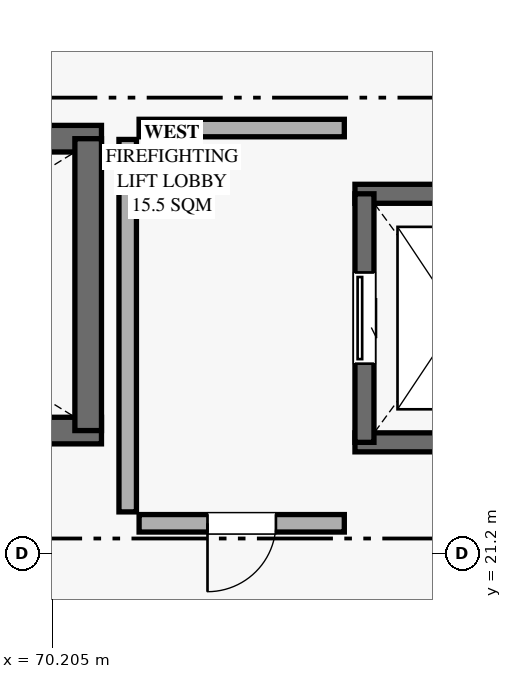
"""IFC4 building model, lengths in metres.
Left out: names, types, materials, properties, quantities, classifications, styles, units other than length and angle.
Written with IfcOpenShell. Run it as: python <this file> out.ifc"""

import sys

from ifc_helpers import new_model, si_unit, direction, frame, frame_2d, origin, place, context, subcontext, project, spatial, rectangle, extrude, element, fill, save


model = new_model("IFC4")
c1 = context("Model", 3, precision=1e-05, world=origin(), true_north=direction((0.0, 1.0)))
c2 = subcontext(c1, "Body", "Model", "MODEL_VIEW")
j1 = project(units=[si_unit("LENGTHUNIT", "METRE"), si_unit("PLANEANGLEUNIT", "RADIAN")], contexts=[c1])
p1 = place(None, origin())
s1 = spatial("IfcSite", under=j1, at=p1, CompositionType="ELEMENT")
p2 = place(p1, origin())
s2 = spatial("IfcBuilding", under=s1, at=p2, CompositionType="ELEMENT")
p3 = place(p2, frame((0.0, 0.0, 24.3)))
s3 = spatial("IfcBuildingStorey", under=s2, at=p3, CompositionType="ELEMENT", Elevation=24.3)
for number, where, z_axis, x_axis in (
    (1, (70.855, 22.82, 0.0), (0.0, 0.0, 1.0), (-1.0, 0.0, 0.0)),
    (2, (62.845, 26.66, 0.0), (0.0, 0.0, 1.0), (1.0, 0.0, 0.0)),
):
    element("IfcWall", number, at=place(p3, frame(where, z_axis=z_axis, x_axis=x_axis)), inside=s3, PredefinedType="SHEAR", context=c2, shape_type="SweptSolid", body=[
        extrude(rectangle(XDim=8.01, YDim=0.35, at=frame_2d((4.005, 0.0))), origin(), (0.0, 0.0, 1.0), 4.23),
    ])
p4 = place(p3, frame((70.68, 26.66, 0.0), z_axis=(0.0, 0.0, 1.0), x_axis=(0.0, -1.0, 0.0)))
e3 = element("IfcWall", 3, at=p4, inside=s3, PredefinedType="SHEAR", context=c2, shape_type="SweptSolid", body=[
    extrude(rectangle(XDim=3.84, YDim=0.35, at=frame_2d((1.92, 0.0))), origin(), (0.0, 0.0, 1.0), 4.23),
])
for number, where, z_axis, x_axis in (
    (4, (76.91, 22.665, 0.0), (0.0, 0.0, 1.0), (-1.0, 0.0, 0.0)),
    (5, (74.19, 25.935, 0.0), (0.0, 0.0, 1.0), (1.0, 0.0, 0.0)),
):
    element("IfcWall", number, at=place(p3, frame(where, z_axis=z_axis, x_axis=x_axis)), inside=s3, PredefinedType="SHEAR", context=c2, shape_type="SweptSolid", body=[
        extrude(rectangle(XDim=2.72, YDim=0.25, at=frame_2d((1.36, 0.0))), origin(), (0.0, 0.0, 1.0), 4.23),
    ])
p5 = place(p3, frame((74.315, 22.665, 0.0), z_axis=(0.0, 0.0, 1.0), x_axis=(0.0, 1.0, 0.0)))
e6 = element("IfcWall", 6, at=p5, inside=s3, PredefinedType="SHEAR", context=c2, shape_type="SweptSolid", body=[
    extrude(rectangle(XDim=3.27, YDim=0.25, at=frame_2d((1.635, 0.0))), origin(), (0.0, 0.0, 1.0), 4.23),
])
p6 = place(p5, frame((1.035, 0.0, 0.0)))
e7 = element("IfcOpeningElement", 7, at=p6, cuts=e6, PredefinedType="OPENING", context=c2, shape_type="SweptSolid", body=[
    extrude(rectangle(XDim=1.2, YDim=2.25, at=frame_2d((0.6, 1.125))), frame((0.0, 0.135, 0.0), z_axis=(0.0, -1.0, 0.0), x_axis=(1.0, 0.0, 0.0)), (0.0, 0.0, 1.0), 0.27),
])
p7 = place(p3, frame((74.05, 21.6, 0.0), z_axis=(0.0, 0.0, 1.0), x_axis=(-1.0, 0.0, 0.0)))
e8 = element("IfcWall", 8, at=p7, inside=s3, PredefinedType="PARTITIONING", context=c2, shape_type="SweptSolid", body=[
    extrude(rectangle(XDim=2.7, YDim=0.23, at=frame_2d((1.35, 0.0))), origin(), (0.0, 0.0, 1.0), 2.98),
])
p8 = place(p7, frame((0.9, 0.0, 0.0)))
e9 = element("IfcOpeningElement", 9, at=p8, cuts=e8, PredefinedType="OPENING", context=c2, shape_type="SweptSolid", body=[
    extrude(rectangle(XDim=0.9, YDim=2.12, at=frame_2d((0.45, 1.06))), frame((0.0, 0.125, 0.0), z_axis=(0.0, -1.0, 0.0), x_axis=(1.0, 0.0, 0.0)), (0.0, 0.0, 1.0), 0.25),
])
p9 = place(p3, frame((71.35, 26.8, 0.0), z_axis=(0.0, 0.0, 1.0), x_axis=(1.0, 0.0, 0.0)))
e10 = element("IfcWall", 10, at=p9, inside=s3, PredefinedType="PARTITIONING", context=c2, shape_type="SweptSolid", body=[
    extrude(rectangle(XDim=2.7, YDim=0.23, at=frame_2d((1.35, 0.0))), origin(), (0.0, 0.0, 1.0), 2.98),
])
p10 = place(p3, frame((71.2, 21.75, 0.0), z_axis=(0.0, 0.0, 1.0), x_axis=(0.0, 1.0, 0.0)))
e11 = element("IfcWall", 11, at=p10, inside=s3, PredefinedType="PARTITIONING", context=c2, shape_type="SweptSolid", body=[
    extrude(rectangle(XDim=4.9, YDim=0.23, at=frame_2d((2.45, 0.0))), origin(), (0.0, 0.0, 1.0), 2.98),
])
p11 = place(p6, origin())
e12 = element("IfcDoor", 12, at=p11, inside=s3, OperationType="SLIDING_TO_LEFT", PredefinedType="DOOR", context=c2, shape_type="SweptSolid", body=[
    extrude(rectangle(XDim=1.2, YDim=2.25, at=frame_2d((0.6, 1.125))), frame((0.0, 0.025, 0.0), z_axis=(0.0, -1.0, 0.0), x_axis=(1.0, 0.0, 0.0)), (0.0, 0.0, 1.0), 0.05),
])
fill(e7, e12)
p12 = place(p8, origin())
e13 = element("IfcDoor", 13, at=p12, inside=s3, OperationType="SINGLE_SWING_RIGHT", PredefinedType="DOOR", context=c2, shape_type="SweptSolid", body=[
    extrude(rectangle(XDim=0.9, YDim=2.12, at=frame_2d((0.45, 1.06))), frame((0.0, 0.025, 0.0), z_axis=(0.0, -1.0, 0.0), x_axis=(1.0, 0.0, 0.0)), (0.0, 0.0, 1.0), 0.05),
])
fill(e9, e13)
save(model, sys.argv[1])
